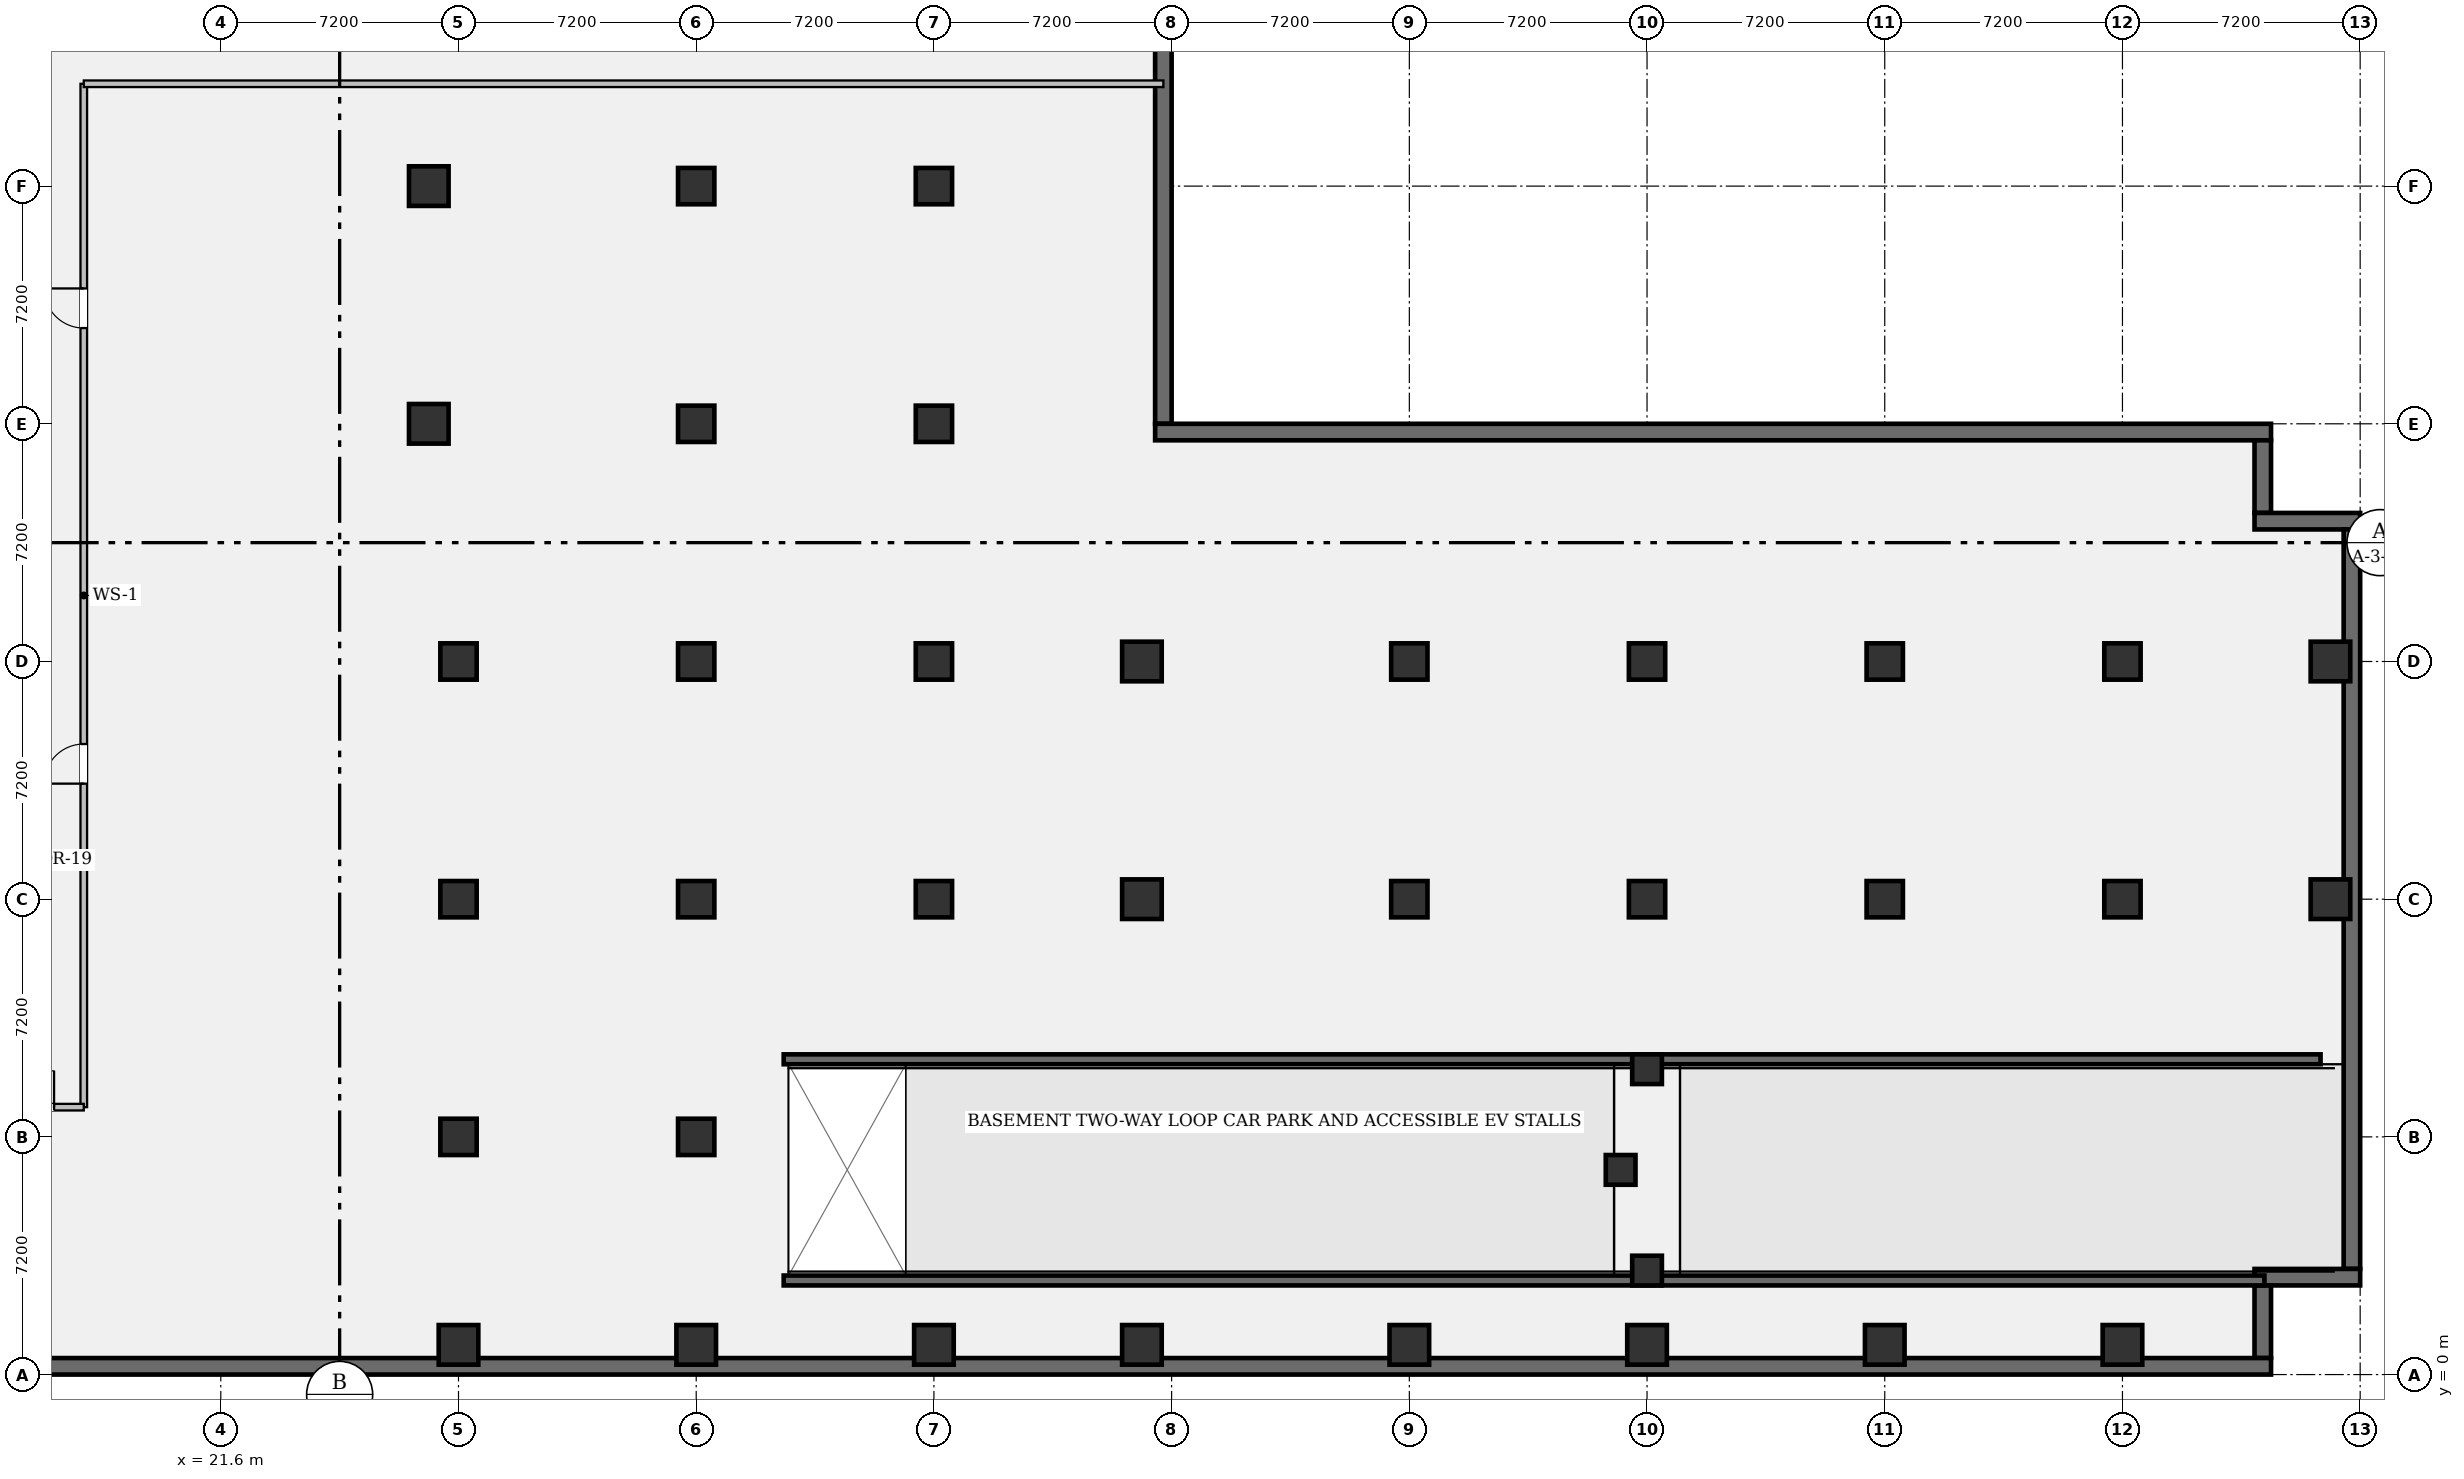
"""IFC4 building model, lengths in metres.
Left out: names, types, materials, properties, quantities, classifications, styles, units other than length and angle.
Written with IfcOpenShell. Run it as: python <this file> out.ifc"""

import sys

from ifc_helpers import new_model, si_unit, direction, frame, frame_2d, origin, origin_2d, place, context, subcontext, project, spatial, rectangle, hollow_rectangle, extrude, element, fill, save


model = new_model("IFC4")
c1 = context("Model", 3, precision=1e-05, world=origin(), true_north=direction((0.0, 1.0)))
c2 = subcontext(c1, "Body", "Model", "MODEL_VIEW")
j1 = project(units=[si_unit("LENGTHUNIT", "METRE"), si_unit("PLANEANGLEUNIT", "RADIAN")], contexts=[c1])
p1 = place(None, origin())
s1 = spatial("IfcSite", under=j1, at=p1, CompositionType="ELEMENT")
p2 = place(p1, origin())
s2 = spatial("IfcBuilding", under=s1, at=p2, CompositionType="ELEMENT")
p3 = place(p2, frame((0.0, 0.0, -4.55)))
s3 = spatial("IfcBuildingStorey", under=s2, at=p3, CompositionType="ELEMENT", Elevation=-4.55)
p4 = place(p3, frame((50.15, 47.2, 0.0), z_axis=(0.0, 0.0, 1.0), x_axis=(0.0, -1.0, 0.0)))
e1 = element("IfcWall", 1, at=p4, inside=s3, PredefinedType="SOLIDWALL", context=c2, shape_type="SweptSolid", body=[
    extrude(rectangle(XDim=18.4, YDim=0.5, at=frame_2d((9.2, 0.0))), origin(), (0.0, 0.0, 1.0), 4.25),
])
p5 = place(p3, frame((49.9, 28.55, 0.0), z_axis=(0.0, 0.0, 1.0), x_axis=(1.0, 0.0, 0.0)))
e2 = element("IfcWall", 2, at=p5, inside=s3, PredefinedType="SOLIDWALL", context=c2, shape_type="SweptSolid", body=[
    extrude(rectangle(XDim=33.8, YDim=0.5, at=frame_2d((16.9, 0.0))), origin(), (0.0, 0.0, 1.0), 4.25),
])
p6 = place(p3, frame((83.45, 28.3, 0.0), z_axis=(0.0, 0.0, 1.0), x_axis=(0.0, -1.0, 0.0)))
e3 = element("IfcWall", 3, at=p6, inside=s3, PredefinedType="SOLIDWALL", context=c2, shape_type="SweptSolid", body=[
    extrude(rectangle(XDim=2.2, YDim=0.5, at=frame_2d((1.1, 0.0))), origin(), (0.0, 0.0, 1.0), 4.25),
])
p7 = place(p3, frame((83.2, 25.85, 0.0), z_axis=(0.0, 0.0, 1.0), x_axis=(1.0, 0.0, 0.0)))
e4 = element("IfcWall", 4, at=p7, inside=s3, PredefinedType="SOLIDWALL", context=c2, shape_type="SweptSolid", body=[
    extrude(rectangle(XDim=3.2, YDim=0.5, at=frame_2d((1.6, 0.0))), origin(), (0.0, 0.0, 1.0), 4.25),
])
p8 = place(p3, frame((86.15, 25.6, 0.0), z_axis=(0.0, 0.0, 1.0), x_axis=(0.0, -1.0, 0.0)))
e5 = element("IfcWall", 5, at=p8, inside=s3, PredefinedType="SOLIDWALL", context=c2, shape_type="SweptSolid", body=[
    extrude(rectangle(XDim=22.4, YDim=0.5, at=frame_2d((11.2, 0.0))), origin(), (0.0, 0.0, 1.0), 4.25),
])
p9 = place(p3, frame((86.4, 2.95, 0.0), z_axis=(0.0, 0.0, 1.0), x_axis=(-1.0, 0.0, 0.0)))
e6 = element("IfcWall", 6, at=p9, inside=s3, PredefinedType="SOLIDWALL", context=c2, shape_type="SweptSolid", body=[
    extrude(rectangle(XDim=3.2, YDim=0.5, at=frame_2d((1.6, 0.0))), origin(), (0.0, 0.0, 1.0), 4.25),
])
p10 = place(p3, frame((83.45, 2.7, 0.0), z_axis=(0.0, 0.0, 1.0), x_axis=(0.0, -1.0, 0.0)))
e7 = element("IfcWall", 7, at=p10, inside=s3, PredefinedType="SOLIDWALL", context=c2, shape_type="SweptSolid", body=[
    extrude(rectangle(XDim=2.2, YDim=0.5, at=frame_2d((1.1, 0.0))), origin(), (0.0, 0.0, 1.0), 4.25),
])
p11 = place(p3, frame((83.7, 0.25, 0.0), z_axis=(0.0, 0.0, 1.0), x_axis=(-1.0, 0.0, 0.0)))
e8 = element("IfcWall", 8, at=p11, inside=s3, PredefinedType="SOLIDWALL", context=c2, shape_type="SweptSolid", body=[
    extrude(rectangle(XDim=81.0, YDim=0.5, at=frame_2d((40.5, 0.0))), origin(), (0.0, 0.0, 1.0), 4.25),
])
for number, where, z_axis, x_axis in (
    (9, (27.9, 28.8, 0.0), (0.0, 0.0, 1.0), (1.0, 0.0, 0.0)),
    (10, (27.9, 36.0, 0.0), (0.0, 0.0, 1.0), (1.0, 0.0, 0.0)),
    (11, (28.8, 0.9, 0.0), (0.0, 0.0, 1.0), (1.0, 0.0, 0.0)),
):
    element("IfcColumn", number, at=place(p3, frame(where, z_axis=z_axis, x_axis=x_axis)), inside=s3, PredefinedType="COLUMN", context=c2, shape_type="SweptSolid", body=[
        extrude(hollow_rectangle(XDim=1.2, YDim=1.2, WallThickness=0.075, at=origin_2d()), origin(), (0.0, 0.0, 1.0), 4.25),
    ])
for number, where, z_axis, x_axis in (
    (12, (28.8, 7.2, 0.0), (0.0, 0.0, 1.0), (1.0, 0.0, 0.0)),
    (13, (28.8, 14.4, 0.0), (0.0, 0.0, 1.0), (1.0, 0.0, 0.0)),
    (14, (28.8, 21.6, 0.0), (0.0, 0.0, 1.0), (1.0, 0.0, 0.0)),
):
    element("IfcColumn", number, at=place(p3, frame(where, z_axis=z_axis, x_axis=x_axis)), inside=s3, PredefinedType="COLUMN", context=c2, shape_type="SweptSolid", body=[
        extrude(rectangle(XDim=1.1, YDim=1.1, at=origin_2d()), origin(), (0.0, 0.0, 1.0), 4.25),
    ])
p12 = place(p3, frame((36.0, 0.9, 0.0), z_axis=(0.0, 0.0, 1.0), x_axis=(1.0, 0.0, 0.0)))
e15 = element("IfcColumn", 15, at=p12, inside=s3, PredefinedType="COLUMN", context=c2, shape_type="SweptSolid", body=[
    extrude(hollow_rectangle(XDim=1.2, YDim=1.2, WallThickness=0.075, at=origin_2d()), origin(), (0.0, 0.0, 1.0), 4.25),
])
for number, where, z_axis, x_axis in (
    (16, (36.0, 7.2, 0.0), (0.0, 0.0, 1.0), (1.0, 0.0, 0.0)),
    (17, (36.0, 14.4, 0.0), (0.0, 0.0, 1.0), (1.0, 0.0, 0.0)),
    (18, (36.0, 21.6, 0.0), (0.0, 0.0, 1.0), (1.0, 0.0, 0.0)),
    (19, (36.0, 28.8, 0.0), (0.0, 0.0, 1.0), (1.0, 0.0, 0.0)),
    (20, (36.0, 36.0, 0.0), (0.0, 0.0, 1.0), (1.0, 0.0, 0.0)),
):
    element("IfcColumn", number, at=place(p3, frame(where, z_axis=z_axis, x_axis=x_axis)), inside=s3, PredefinedType="COLUMN", context=c2, shape_type="SweptSolid", body=[
        extrude(rectangle(XDim=1.1, YDim=1.1, at=origin_2d()), origin(), (0.0, 0.0, 1.0), 4.25),
    ])
p13 = place(p3, frame((43.2, 0.9, 0.0), z_axis=(0.0, 0.0, 1.0), x_axis=(1.0, 0.0, 0.0)))
e21 = element("IfcColumn", 21, at=p13, inside=s3, PredefinedType="COLUMN", context=c2, shape_type="SweptSolid", body=[
    extrude(hollow_rectangle(XDim=1.2, YDim=1.2, WallThickness=0.075, at=origin_2d()), origin(), (0.0, 0.0, 1.0), 4.25),
])
for number, where, z_axis, x_axis in (
    (22, (43.2, 14.4, 0.0), (0.0, 0.0, 1.0), (1.0, 0.0, 0.0)),
    (23, (43.2, 21.6, 0.0), (0.0, 0.0, 1.0), (1.0, 0.0, 0.0)),
    (24, (43.2, 28.8, 0.0), (0.0, 0.0, 1.0), (1.0, 0.0, 0.0)),
    (25, (43.2, 36.0, 0.0), (0.0, 0.0, 1.0), (1.0, 0.0, 0.0)),
):
    element("IfcColumn", number, at=place(p3, frame(where, z_axis=z_axis, x_axis=x_axis)), inside=s3, PredefinedType="COLUMN", context=c2, shape_type="SweptSolid", body=[
        extrude(rectangle(XDim=1.1, YDim=1.1, at=origin_2d()), origin(), (0.0, 0.0, 1.0), 4.25),
    ])
for number, where, z_axis, x_axis in (
    (26, (49.5, 0.9, 0.0), (0.0, 0.0, 1.0), (1.0, 0.0, 0.0)),
    (27, (49.5, 14.4, 0.0), (0.0, 0.0, 1.0), (1.0, 0.0, 0.0)),
    (28, (49.5, 21.6, 0.0), (0.0, 0.0, 1.0), (1.0, 0.0, 0.0)),
    (29, (57.6, 0.9, 0.0), (0.0, 0.0, 1.0), (1.0, 0.0, 0.0)),
):
    element("IfcColumn", number, at=place(p3, frame(where, z_axis=z_axis, x_axis=x_axis)), inside=s3, PredefinedType="COLUMN", context=c2, shape_type="SweptSolid", body=[
        extrude(hollow_rectangle(XDim=1.2, YDim=1.2, WallThickness=0.075, at=origin_2d()), origin(), (0.0, 0.0, 1.0), 4.25),
    ])
for number, where, z_axis, x_axis in (
    (30, (57.6, 14.4, 0.0), (0.0, 0.0, 1.0), (1.0, 0.0, 0.0)),
    (31, (57.6, 21.6, 0.0), (0.0, 0.0, 1.0), (1.0, 0.0, 0.0)),
):
    element("IfcColumn", number, at=place(p3, frame(where, z_axis=z_axis, x_axis=x_axis)), inside=s3, PredefinedType="COLUMN", context=c2, shape_type="SweptSolid", body=[
        extrude(rectangle(XDim=1.1, YDim=1.1, at=origin_2d()), origin(), (0.0, 0.0, 1.0), 4.25),
    ])
p14 = place(p3, frame((64.8, 0.9, 0.0), z_axis=(0.0, 0.0, 1.0), x_axis=(1.0, 0.0, 0.0)))
e32 = element("IfcColumn", 32, at=p14, inside=s3, PredefinedType="COLUMN", context=c2, shape_type="SweptSolid", body=[
    extrude(hollow_rectangle(XDim=1.2, YDim=1.2, WallThickness=0.075, at=origin_2d()), origin(), (0.0, 0.0, 1.0), 4.25),
])
for number, where, z_axis, x_axis in (
    (33, (64.8, 14.4, 0.0), (0.0, 0.0, 1.0), (1.0, 0.0, 0.0)),
    (34, (64.8, 21.6, 0.0), (0.0, 0.0, 1.0), (1.0, 0.0, 0.0)),
):
    element("IfcColumn", number, at=place(p3, frame(where, z_axis=z_axis, x_axis=x_axis)), inside=s3, PredefinedType="COLUMN", context=c2, shape_type="SweptSolid", body=[
        extrude(rectangle(XDim=1.1, YDim=1.1, at=origin_2d()), origin(), (0.0, 0.0, 1.0), 4.25),
    ])
p15 = place(p3, frame((72.0, 0.9, 0.0), z_axis=(0.0, 0.0, 1.0), x_axis=(1.0, 0.0, 0.0)))
e35 = element("IfcColumn", 35, at=p15, inside=s3, PredefinedType="COLUMN", context=c2, shape_type="SweptSolid", body=[
    extrude(hollow_rectangle(XDim=1.2, YDim=1.2, WallThickness=0.075, at=origin_2d()), origin(), (0.0, 0.0, 1.0), 4.25),
])
for number, where, z_axis, x_axis in (
    (36, (72.0, 14.4, 0.0), (0.0, 0.0, 1.0), (1.0, 0.0, 0.0)),
    (37, (72.0, 21.6, 0.0), (0.0, 0.0, 1.0), (1.0, 0.0, 0.0)),
):
    element("IfcColumn", number, at=place(p3, frame(where, z_axis=z_axis, x_axis=x_axis)), inside=s3, PredefinedType="COLUMN", context=c2, shape_type="SweptSolid", body=[
        extrude(rectangle(XDim=1.1, YDim=1.1, at=origin_2d()), origin(), (0.0, 0.0, 1.0), 4.25),
    ])
p16 = place(p3, frame((79.2, 0.9, 0.0), z_axis=(0.0, 0.0, 1.0), x_axis=(1.0, 0.0, 0.0)))
e38 = element("IfcColumn", 38, at=p16, inside=s3, PredefinedType="COLUMN", context=c2, shape_type="SweptSolid", body=[
    extrude(hollow_rectangle(XDim=1.2, YDim=1.2, WallThickness=0.075, at=origin_2d()), origin(), (0.0, 0.0, 1.0), 4.25),
])
for number, where, z_axis, x_axis in (
    (39, (79.2, 14.4, 0.0), (0.0, 0.0, 1.0), (1.0, 0.0, 0.0)),
    (40, (79.2, 21.6, 0.0), (0.0, 0.0, 1.0), (1.0, 0.0, 0.0)),
):
    element("IfcColumn", number, at=place(p3, frame(where, z_axis=z_axis, x_axis=x_axis)), inside=s3, PredefinedType="COLUMN", context=c2, shape_type="SweptSolid", body=[
        extrude(rectangle(XDim=1.1, YDim=1.1, at=origin_2d()), origin(), (0.0, 0.0, 1.0), 4.25),
    ])
for number, where, z_axis, x_axis in (
    (41, (85.5, 14.4, 0.0), (0.0, 0.0, 1.0), (1.0, 0.0, 0.0)),
    (42, (85.5, 21.6, 0.0), (0.0, 0.0, 1.0), (1.0, 0.0, 0.0)),
):
    element("IfcColumn", number, at=place(p3, frame(where, z_axis=z_axis, x_axis=x_axis)), inside=s3, PredefinedType="COLUMN", context=c2, shape_type="SweptSolid", body=[
        extrude(hollow_rectangle(XDim=1.2, YDim=1.2, WallThickness=0.075, at=origin_2d()), origin(), (0.0, 0.0, 1.0), 4.25),
    ])
p17 = place(p3, frame((38.65, 2.85, 0.0), z_axis=(0.0, 0.0, 1.0), x_axis=(1.0, 0.0, 0.0)))
e43 = element("IfcWall", 43, at=p17, inside=s3, PredefinedType="SHEAR", context=c2, shape_type="SweptSolid", body=[
    extrude(rectangle(XDim=44.85, YDim=0.3, at=frame_2d((22.425, 0.0))), origin(), (0.0, 0.0, 1.0), 4.25),
])
p18 = place(p3, frame((38.65, 9.55, 0.0), z_axis=(0.0, 0.0, 1.0), x_axis=(1.0, 0.0, 0.0)))
e44 = element("IfcWall", 44, at=p18, inside=s3, PredefinedType="SHEAR", context=c2, shape_type="SweptSolid", body=[
    extrude(rectangle(XDim=46.55, YDim=0.3, at=frame_2d((23.275, 0.0))), origin(), (0.0, 0.0, 1.0), 4.25),
])
for number, where, z_axis, x_axis in (
    (45, (64.8, 3.15, 0.0), (0.0, 0.0, 1.0), (1.0, 0.0, 0.0)),
    (46, (64.0, 6.2, 0.0), (0.0, 0.0, 1.0), (1.0, 0.0, 0.0)),
    (47, (64.8, 9.25, 0.0), (0.0, 0.0, 1.0), (1.0, 0.0, 0.0)),
):
    element("IfcColumn", number, at=place(p3, frame(where, z_axis=z_axis, x_axis=x_axis)), inside=s3, PredefinedType="COLUMN", context=c2, shape_type="SweptSolid", body=[
        extrude(rectangle(XDim=0.9, YDim=0.9, at=origin_2d()), origin(), (0.0, 0.0, 1.0), 1.955),
    ])
p19 = place(p3, frame((17.45, 8.1, 0.0), z_axis=(0.0, 0.0, 1.0), x_axis=(0.0, 1.0, 0.0)))
e48 = element("IfcWall", 48, at=p19, inside=s3, PredefinedType="PARTITIONING", context=c2, shape_type="SweptSolid", body=[
    extrude(rectangle(XDim=31.0, YDim=0.2, at=frame_2d((15.5, 0.0))), origin(), (0.0, 0.0, 1.0), 3.288),
])
p20 = place(p19, frame((9.8, 0.0, 0.0)))
e49 = element("IfcOpeningElement", 49, at=p20, cuts=e48, PredefinedType="OPENING", context=c2, shape_type="SweptSolid", body=[
    extrude(rectangle(XDim=1.2, YDim=2.15, at=frame_2d((0.6, 1.075))), frame((0.0, 0.112, 0.0), z_axis=(0.0, -1.0, 0.0), x_axis=(1.0, 0.0, 0.0)), (0.0, 0.0, 1.0), 0.224),
])
p21 = place(p19, frame((23.6, 0.0, 0.0)))
e50 = element("IfcOpeningElement", 50, at=p21, cuts=e48, PredefinedType="OPENING", context=c2, shape_type="SweptSolid", body=[
    extrude(rectangle(XDim=1.2, YDim=2.15, at=frame_2d((0.6, 1.075))), frame((0.0, 0.112, 0.0), z_axis=(0.0, -1.0, 0.0), x_axis=(1.0, 0.0, 0.0)), (0.0, 0.0, 1.0), 0.224),
])
p22 = place(p3, frame((14.4, 8.1, 0.0), z_axis=(0.0, 0.0, 1.0), x_axis=(1.0, 0.0, 0.0)))
e51 = element("IfcWall", 51, at=p22, inside=s3, PredefinedType="PARTITIONING", context=c2, shape_type="SweptSolid", body=[
    extrude(rectangle(XDim=3.05, YDim=0.2, at=frame_2d((1.525, 0.0))), origin(), (0.0, 0.0, 1.0), 3.288),
])
p23 = place(p22, frame((1.05, 0.0, 0.0)))
e52 = element("IfcOpeningElement", 52, at=p23, cuts=e51, PredefinedType="OPENING", context=c2, shape_type="SweptSolid", body=[
    extrude(rectangle(XDim=1.1, YDim=2.15, at=frame_2d((0.55, 1.075))), frame((0.0, 0.112, 0.0), z_axis=(0.0, -1.0, 0.0), x_axis=(1.0, 0.0, 0.0)), (0.0, 0.0, 1.0), 0.224),
])
p24 = place(p3, frame((17.45, 39.1, 0.0), z_axis=(0.0, 0.0, 1.0), x_axis=(1.0, 0.0, 0.0)))
e53 = element("IfcWall", 53, at=p24, inside=s3, PredefinedType="PARTITIONING", context=c2, shape_type="SweptSolid", body=[
    extrude(rectangle(XDim=32.7, YDim=0.2, at=frame_2d((16.35, 0.0))), origin(), (0.0, 0.0, 1.0), 3.288),
])
p25 = place(p23, origin())
e54 = element("IfcDoor", 54, at=p25, inside=s3, OperationType="SINGLE_SWING_RIGHT", PredefinedType="DOOR", context=c2, shape_type="SweptSolid", body=[
    extrude(rectangle(XDim=1.1, YDim=2.15, at=frame_2d((0.55, 1.075))), frame((0.0, 0.025, 0.0), z_axis=(0.0, -1.0, 0.0), x_axis=(1.0, 0.0, 0.0)), (0.0, 0.0, 1.0), 0.05),
])
fill(e52, e54)
p26 = place(p20, origin())
e55 = element("IfcDoor", 55, at=p26, inside=s3, OperationType="SINGLE_SWING_LEFT", PredefinedType="DOOR", context=c2, shape_type="SweptSolid", body=[
    extrude(rectangle(XDim=1.2, YDim=2.15, at=frame_2d((0.6, 1.075))), frame((0.0, 0.025, 0.0), z_axis=(0.0, -1.0, 0.0), x_axis=(1.0, 0.0, 0.0)), (0.0, 0.0, 1.0), 0.05),
])
fill(e49, e55)
p27 = place(p21, origin())
e56 = element("IfcDoor", 56, at=p27, inside=s3, OperationType="SINGLE_SWING_RIGHT", PredefinedType="DOOR", context=c2, shape_type="SweptSolid", body=[
    extrude(rectangle(XDim=1.2, YDim=2.15, at=frame_2d((0.6, 1.075))), frame((0.0, 0.025, 0.0), z_axis=(0.0, -1.0, 0.0), x_axis=(1.0, 0.0, 0.0)), (0.0, 0.0, 1.0), 0.05),
])
fill(e50, e56)
save(model, sys.argv[1])
